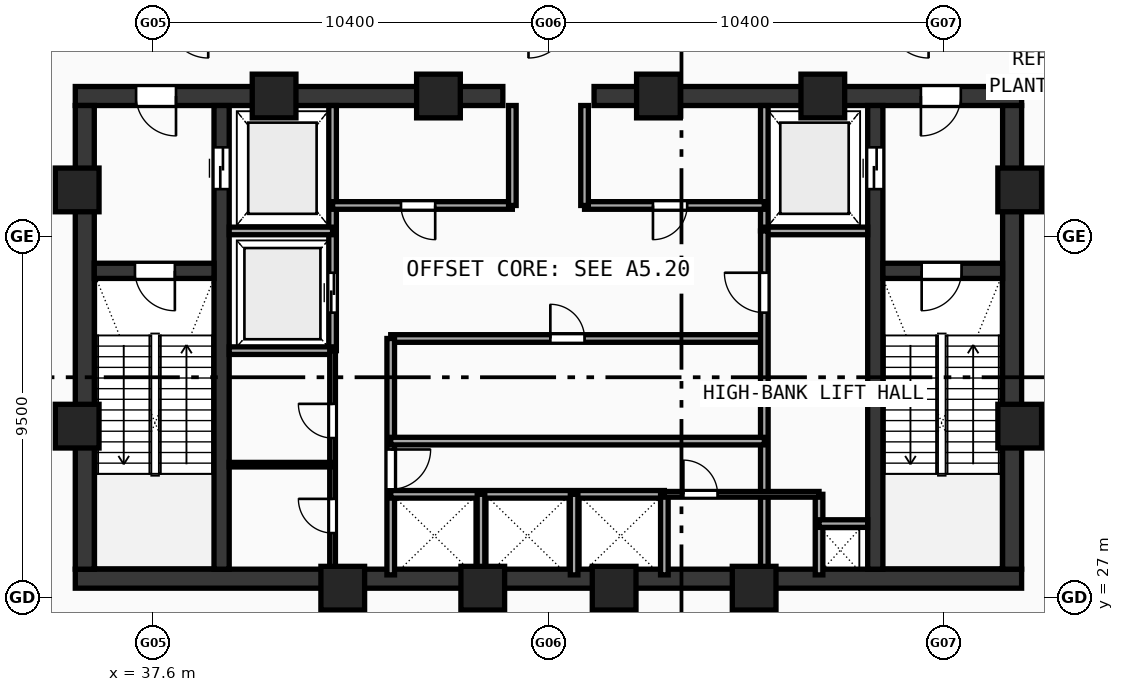
"""IFC4 building model, lengths in metres.
Left out: names, types, materials, properties, quantities, classifications, styles, units other than length and angle.
Written with IfcOpenShell. Run it as: python <this file> out.ifc"""

import sys

from ifc_helpers import new_model, si_unit, direction, frame, frame_2d, origin, origin_with_axes, origin_2d, place, context, subcontext, project, spatial, rectangle, hollow_rectangle, extrude, source, transform, mapped, element, fill, save


model = new_model("IFC4")
c1 = context("Model", 3, precision=1e-05, world=origin(), true_north=direction((0.0, 1.0)))
c2 = subcontext(c1, "Body", "Model", "MODEL_VIEW")
j1 = project(units=[si_unit("LENGTHUNIT", "METRE"), si_unit("PLANEANGLEUNIT", "RADIAN")], contexts=[c1])
p1 = place(None, origin())
s1 = spatial("IfcSite", under=j1, at=p1, CompositionType="ELEMENT")
p2 = place(p1, origin())
s2 = spatial("IfcBuilding", under=s1, at=p2, CompositionType="ELEMENT")
p3 = place(p2, frame((0.0, 0.0, 320.71)))
s3 = spatial("IfcBuildingStorey", under=s2, at=p3, CompositionType="ELEMENT", Elevation=320.71)
p4 = place(p3, frame((35.55, 27.5, 0.0), z_axis=(0.0, 0.0, 1.0), x_axis=(1.0, 0.0, 0.0)))
e1 = element("IfcWall", 1, at=p4, inside=s3, PredefinedType="SHEAR", context=c2, shape_type="SweptSolid", body=[
    extrude(rectangle(XDim=24.9, YDim=0.5, at=frame_2d((12.45, 0.0))), origin(), (0.0, 0.0, 1.0), 4.54),
])
p5 = place(p3, frame((35.55, 40.2, 0.0), z_axis=(0.0, 0.0, 1.0), x_axis=(1.0, 0.0, 0.0)))
e2 = element("IfcWall", 2, at=p5, inside=s3, PredefinedType="SHEAR", context=c2, shape_type="SweptSolid", body=[
    extrude(rectangle(XDim=11.25, YDim=0.5, at=frame_2d((5.625, 0.0))), origin(), (0.0, 0.0, 1.0), 4.54),
])
p6 = place(p5, frame((1.6, 0.0, 0.0)))
e3 = element("IfcOpeningElement", 3, at=p6, cuts=e2, PredefinedType="OPENING", context=c2, shape_type="SweptSolid", body=[
    extrude(rectangle(XDim=1.05, YDim=2.1, at=frame_2d((0.525, 1.05))), frame((0.0, 0.26, 0.0), z_axis=(0.0, -1.0, 0.0), x_axis=(1.0, 0.0, 0.0)), (0.0, 0.0, 1.0), 0.52),
])
p7 = place(p3, frame((49.2, 40.2, 0.0), z_axis=(0.0, 0.0, 1.0), x_axis=(1.0, 0.0, 0.0)))
e4 = element("IfcWall", 4, at=p7, inside=s3, PredefinedType="SHEAR", context=c2, shape_type="SweptSolid", body=[
    extrude(rectangle(XDim=11.25, YDim=0.5, at=frame_2d((5.625, 0.0))), origin(), (0.0, 0.0, 1.0), 4.54),
])
p8 = place(p7, frame((8.6, 0.0, 0.0)))
e5 = element("IfcOpeningElement", 5, at=p8, cuts=e4, PredefinedType="OPENING", context=c2, shape_type="SweptSolid", body=[
    extrude(rectangle(XDim=1.05, YDim=2.1, at=frame_2d((0.525, 1.05))), frame((0.0, 0.26, 0.0), z_axis=(0.0, -1.0, 0.0), x_axis=(1.0, 0.0, 0.0)), (0.0, 0.0, 1.0), 0.52),
])
for number, where, z_axis, x_axis in (
    (6, (35.8, 27.75, 0.0), (0.0, 0.0, 1.0), (0.0, 1.0, 0.0)),
    (7, (60.2, 27.75, 0.0), (0.0, 0.0, 1.0), (0.0, 1.0, 0.0)),
):
    element("IfcWall", number, at=place(p3, frame(where, z_axis=z_axis, x_axis=x_axis)), inside=s3, PredefinedType="SHEAR", context=c2, shape_type="SweptSolid", body=[
        extrude(rectangle(XDim=12.2, YDim=0.5, at=frame_2d((6.1, 0.0))), origin(), (0.0, 0.0, 1.0), 4.54),
    ])
p9 = place(p3, frame((39.4, 27.75, 0.0), z_axis=(0.0, 0.0, 1.0), x_axis=(0.0, 1.0, 0.0)))
e8 = element("IfcWall", 8, at=p9, inside=s3, PredefinedType="SHEAR", context=c2, shape_type="SweptSolid", body=[
    extrude(rectangle(XDim=12.2, YDim=0.4, at=frame_2d((6.1, 0.0))), origin(), (0.0, 0.0, 1.0), 4.54),
])
p10 = place(p9, frame((10.0, 0.0, 0.0)))
e9 = element("IfcOpeningElement", 9, at=p10, cuts=e8, PredefinedType="OPENING", context=c2, shape_type="SweptSolid", body=[
    extrude(rectangle(XDim=1.1, YDim=2.1, at=frame_2d((0.55, 1.05))), frame((0.0, 0.21, 0.0), z_axis=(0.0, -1.0, 0.0), x_axis=(1.0, 0.0, 0.0)), (0.0, 0.0, 1.0), 0.42),
])
p11 = place(p3, frame((56.6, 27.75, 0.0), z_axis=(0.0, 0.0, 1.0), x_axis=(0.0, 1.0, 0.0)))
e10 = element("IfcWall", 10, at=p11, inside=s3, PredefinedType="SHEAR", context=c2, shape_type="SweptSolid", body=[
    extrude(rectangle(XDim=12.2, YDim=0.4, at=frame_2d((6.1, 0.0))), origin(), (0.0, 0.0, 1.0), 4.54),
])
p12 = place(p11, frame((10.0, 0.0, 0.0)))
e11 = element("IfcOpeningElement", 11, at=p12, cuts=e10, PredefinedType="OPENING", context=c2, shape_type="SweptSolid", body=[
    extrude(rectangle(XDim=1.1, YDim=2.1, at=frame_2d((0.55, 1.05))), frame((0.0, 0.21, 0.0), z_axis=(0.0, -1.0, 0.0), x_axis=(1.0, 0.0, 0.0)), (0.0, 0.0, 1.0), 0.42),
])
p13 = place(p3, frame((36.05, 35.6, 0.0), z_axis=(0.0, 0.0, 1.0), x_axis=(1.0, 0.0, 0.0)))
e12 = element("IfcWall", 12, at=p13, inside=s3, PredefinedType="SHEAR", context=c2, shape_type="SweptSolid", body=[
    extrude(rectangle(XDim=3.15, YDim=0.4, at=frame_2d((1.575, 0.0))), origin(), (0.0, 0.0, 1.0), 4.54),
])
p14 = place(p13, frame((1.07, 0.0, 0.0)))
e13 = element("IfcOpeningElement", 13, at=p14, cuts=e12, PredefinedType="OPENING", context=c2, shape_type="SweptSolid", body=[
    extrude(rectangle(XDim=1.05, YDim=2.1, at=frame_2d((0.525, 1.05))), frame((0.0, 0.21, 0.0), z_axis=(0.0, -1.0, 0.0), x_axis=(1.0, 0.0, 0.0)), (0.0, 0.0, 1.0), 0.42),
])
p15 = place(p3, frame((56.8, 35.6, 0.0), z_axis=(0.0, 0.0, 1.0), x_axis=(1.0, 0.0, 0.0)))
e14 = element("IfcWall", 14, at=p15, inside=s3, PredefinedType="SHEAR", context=c2, shape_type="SweptSolid", body=[
    extrude(rectangle(XDim=3.15, YDim=0.4, at=frame_2d((1.575, 0.0))), origin(), (0.0, 0.0, 1.0), 4.54),
])
p16 = place(p15, frame((1.02, 0.0, 0.0)))
e15 = element("IfcOpeningElement", 15, at=p16, cuts=e14, PredefinedType="OPENING", context=c2, shape_type="SweptSolid", body=[
    extrude(rectangle(XDim=1.05, YDim=2.1, at=frame_2d((0.525, 1.05))), frame((0.0, 0.21, 0.0), z_axis=(0.0, -1.0, 0.0), x_axis=(1.0, 0.0, 0.0)), (0.0, 0.0, 1.0), 0.42),
])
m1 = source(origin(), c2, "Body", "SweptSolid", [
    extrude(hollow_rectangle(XDim=1.15, YDim=1.15, WallThickness=0.048, at=origin_2d()), origin(), (0.0, 0.0, 1.0), 4.82),
])
for number, where, z_axis, x_axis in (
    (16, (42.588, 27.25, -0.28), (0.0, 0.0, 1.0), (1.0, 0.0, 0.0)),
    (17, (46.272, 27.25, -0.28), (0.0, 0.0, 1.0), (1.0, 0.0, 0.0)),
    (18, (49.729, 27.25, -0.28), (0.0, 0.0, 1.0), (1.0, 0.0, 0.0)),
    (19, (53.412, 27.25, -0.28), (0.0, 0.0, 1.0), (1.0, 0.0, 0.0)),
    (20, (60.4, 31.513, -0.28), (0.0, 0.0, 1.0), (1.0, 0.0, 0.0)),
    (21, (60.4, 37.729, -0.28), (0.0, 0.0, 1.0), (1.0, 0.0, 0.0)),
    (22, (55.219, 40.2, -0.28), (0.0, 0.0, 1.0), (1.0, 0.0, 0.0)),
    (23, (50.894, 40.2, -0.28), (0.0, 0.0, 1.0), (1.0, 0.0, 0.0)),
    (24, (45.106, 40.2, -0.28), (0.0, 0.0, 1.0), (1.0, 0.0, 0.0)),
    (25, (40.781, 40.2, -0.28), (0.0, 0.0, 1.0), (1.0, 0.0, 0.0)),
    (26, (35.6, 37.729, -0.28), (0.0, 0.0, 1.0), (1.0, 0.0, 0.0)),
    (27, (35.6, 31.513, -0.28), (0.0, 0.0, 1.0), (1.0, 0.0, 0.0)),
):
    element("IfcColumn", number, at=place(p3, frame(where, z_axis=z_axis, x_axis=x_axis)), inside=s3, PredefinedType="COLUMN", context=c2, shape_type="MappedRepresentation", body=[
        mapped(m1, transform((0.0, 0.0, 0.0), scale=1.0)),
    ])
p17 = place(p3, frame((42.32, 33.5, 0.0), z_axis=(0.0, 0.0, 1.0), x_axis=(0.0, 1.0, 0.0)))
e28 = element("IfcWall", 28, at=p17, inside=s3, PredefinedType="SOLIDWALL", context=c2, shape_type="SweptSolid", body=[
    extrude(rectangle(XDim=6.45, YDim=0.2, at=frame_2d((3.225, 0.0))), origin(), (0.0, 0.0, 1.0), 4.54),
])
p18 = place(p17, frame((1.0, 0.0, 0.0)))
e29 = element("IfcOpeningElement", 29, at=p18, cuts=e28, PredefinedType="OPENING", context=c2, shape_type="SweptSolid", body=[
    extrude(rectangle(XDim=1.05, YDim=2.1, at=frame_2d((0.525, 1.05))), frame((0.0, 0.11, 0.0), z_axis=(0.0, -1.0, 0.0), x_axis=(1.0, 0.0, 0.0)), (0.0, 0.0, 1.0), 0.22),
])
for number, where, z_axis, x_axis in (
    (30, (39.6, 36.65, 0.0), (0.0, 0.0, 1.0), (1.0, 0.0, 0.0)),
    (31, (39.6, 33.5, 0.0), (0.0, 0.0, 1.0), (1.0, 0.0, 0.0)),
):
    element("IfcWall", number, at=place(p3, frame(where, z_axis=z_axis, x_axis=x_axis)), inside=s3, PredefinedType="SOLIDWALL", context=c2, shape_type="SweptSolid", body=[
        extrude(rectangle(XDim=2.72, YDim=0.2, at=frame_2d((1.36, 0.0))), origin(), (0.0, 0.0, 1.0), 4.54),
    ])
p19 = place(p3, frame((53.68, 36.65, 0.0), z_axis=(0.0, 0.0, 1.0), x_axis=(0.0, 1.0, 0.0)))
e32 = element("IfcWall", 32, at=p19, inside=s3, PredefinedType="SOLIDWALL", context=c2, shape_type="SweptSolid", body=[
    extrude(rectangle(XDim=3.3, YDim=0.2, at=frame_2d((1.65, 0.0))), origin(), (0.0, 0.0, 1.0), 4.54),
])
p20 = place(p3, frame((53.68, 36.65, 0.0), z_axis=(0.0, 0.0, 1.0), x_axis=(1.0, 0.0, 0.0)))
e33 = element("IfcWall", 33, at=p20, inside=s3, PredefinedType="SOLIDWALL", context=c2, shape_type="SweptSolid", body=[
    extrude(rectangle(XDim=2.72, YDim=0.2, at=frame_2d((1.36, 0.0))), origin(), (0.0, 0.0, 1.0), 4.54),
])
p21 = place(p3, frame((42.32, 37.32, 0.0), z_axis=(0.0, 0.0, 1.0), x_axis=(1.0, 0.0, 0.0)))
e34 = element("IfcWall", 34, at=p21, inside=s3, PredefinedType="SOLIDWALL", context=c2, shape_type="SweptSolid", body=[
    extrude(rectangle(XDim=4.73, YDim=0.2, at=frame_2d((2.365, 0.0))), origin(), (0.0, 0.0, 1.0), 4.54),
])
p22 = place(p21, frame((1.8, 0.0, 0.0)))
e35 = element("IfcOpeningElement", 35, at=p22, cuts=e34, PredefinedType="OPENING", context=c2, shape_type="SweptSolid", body=[
    extrude(rectangle(XDim=0.9, YDim=2.1, at=frame_2d((0.45, 1.05))), frame((0.0, 0.11, 0.0), z_axis=(0.0, -1.0, 0.0), x_axis=(1.0, 0.0, 0.0)), (0.0, 0.0, 1.0), 0.22),
])
p23 = place(p3, frame((48.95, 37.32, 0.0), z_axis=(0.0, 0.0, 1.0), x_axis=(1.0, 0.0, 0.0)))
e36 = element("IfcWall", 36, at=p23, inside=s3, PredefinedType="SOLIDWALL", context=c2, shape_type="SweptSolid", body=[
    extrude(rectangle(XDim=4.73, YDim=0.2, at=frame_2d((2.365, 0.0))), origin(), (0.0, 0.0, 1.0), 4.54),
])
p24 = place(p23, frame((1.8, 0.0, 0.0)))
e37 = element("IfcOpeningElement", 37, at=p24, cuts=e36, PredefinedType="OPENING", context=c2, shape_type="SweptSolid", body=[
    extrude(rectangle(XDim=0.9, YDim=2.1, at=frame_2d((0.45, 1.05))), frame((0.0, 0.11, 0.0), z_axis=(0.0, -1.0, 0.0), x_axis=(1.0, 0.0, 0.0)), (0.0, 0.0, 1.0), 0.22),
])
for number, where, z_axis, x_axis in (
    (38, (47.05, 37.32, 0.0), (0.0, 0.0, 1.0), (0.0, 1.0, 0.0)),
    (39, (48.95, 37.32, 0.0), (0.0, 0.0, 1.0), (0.0, 1.0, 0.0)),
):
    element("IfcWall", number, at=place(p3, frame(where, z_axis=z_axis, x_axis=x_axis)), inside=s3, PredefinedType="SOLIDWALL", context=c2, shape_type="SweptSolid", body=[
        extrude(rectangle(XDim=2.63, YDim=0.2, at=frame_2d((1.315, 0.0))), origin(), (0.0, 0.0, 1.0), 4.54),
    ])
p25 = place(p3, frame((43.85, 33.82, 0.0), z_axis=(0.0, 0.0, 1.0), x_axis=(1.0, 0.0, 0.0)))
e40 = element("IfcWall", 40, at=p25, inside=s3, PredefinedType="SOLIDWALL", context=c2, shape_type="SweptSolid", body=[
    extrude(rectangle(XDim=9.83, YDim=0.2, at=frame_2d((4.915, 0.0))), origin(), (0.0, 0.0, 1.0), 4.54),
])
p26 = place(p25, frame((4.2, 0.0, 0.0)))
e41 = element("IfcOpeningElement", 41, at=p26, cuts=e40, PredefinedType="OPENING", context=c2, shape_type="SweptSolid", body=[
    extrude(rectangle(XDim=0.9, YDim=2.1, at=frame_2d((0.45, 1.05))), frame((0.0, 0.11, 0.0), z_axis=(0.0, -1.0, 0.0), x_axis=(1.0, 0.0, 0.0)), (0.0, 0.0, 1.0), 0.22),
])
p27 = place(p3, frame((43.85, 27.6, 0.0), z_axis=(0.0, 0.0, 1.0), x_axis=(0.0, 1.0, 0.0)))
e42 = element("IfcWall", 42, at=p27, inside=s3, PredefinedType="SOLIDWALL", context=c2, shape_type="SweptSolid", body=[
    extrude(rectangle(XDim=6.22, YDim=0.2, at=frame_2d((3.11, 0.0))), origin(), (0.0, 0.0, 1.0), 4.54),
])
p28 = place(p27, frame((2.25, 0.0, 0.0)))
e43 = element("IfcOpeningElement", 43, at=p28, cuts=e42, PredefinedType="OPENING", context=c2, shape_type="SweptSolid", body=[
    extrude(rectangle(XDim=1.05, YDim=2.1, at=frame_2d((0.525, 1.05))), frame((0.0, 0.11, 0.0), z_axis=(0.0, -1.0, 0.0), x_axis=(1.0, 0.0, 0.0)), (0.0, 0.0, 1.0), 0.22),
])
p29 = place(p3, frame((53.68, 27.6, 0.0), z_axis=(0.0, 0.0, 1.0), x_axis=(0.0, 1.0, 0.0)))
e44 = element("IfcWall", 44, at=p29, inside=s3, PredefinedType="SOLIDWALL", context=c2, shape_type="SweptSolid", body=[
    extrude(rectangle(XDim=9.05, YDim=0.2, at=frame_2d((4.525, 0.0))), origin(), (0.0, 0.0, 1.0), 4.54),
])
p30 = place(p29, frame((6.9, 0.0, 0.0)))
e45 = element("IfcOpeningElement", 45, at=p30, cuts=e44, PredefinedType="OPENING", context=c2, shape_type="SweptSolid", body=[
    extrude(rectangle(XDim=1.05, YDim=2.1, at=frame_2d((0.525, 1.05))), frame((0.0, 0.11, 0.0), z_axis=(0.0, -1.0, 0.0), x_axis=(1.0, 0.0, 0.0)), (0.0, 0.0, 1.0), 0.22),
])
p31 = place(p3, frame((43.85, 29.72, 0.0), z_axis=(0.0, 0.0, 1.0), x_axis=(1.0, 0.0, 0.0)))
e46 = element("IfcWall", 46, at=p31, inside=s3, PredefinedType="SOLIDWALL", context=c2, shape_type="SweptSolid", body=[
    extrude(rectangle(XDim=7.2, YDim=0.2, at=frame_2d((3.6, 0.0))), origin(), (0.0, 0.0, 1.0), 4.54),
])
p32 = place(p3, frame((51.05, 27.6, 0.0), z_axis=(0.0, 0.0, 1.0), x_axis=(0.0, 1.0, 0.0)))
e47 = element("IfcWall", 47, at=p32, inside=s3, PredefinedType="SOLIDWALL", context=c2, shape_type="SweptSolid", body=[
    extrude(rectangle(XDim=2.12, YDim=0.2, at=frame_2d((1.06, 0.0))), origin(), (0.0, 0.0, 1.0), 4.54),
])
p33 = place(p3, frame((43.85, 31.12, 0.0), z_axis=(0.0, 0.0, 1.0), x_axis=(1.0, 0.0, 0.0)))
e48 = element("IfcWall", 48, at=p33, inside=s3, PredefinedType="SOLIDWALL", context=c2, shape_type="SweptSolid", body=[
    extrude(rectangle(XDim=9.83, YDim=0.2, at=frame_2d((4.915, 0.0))), origin(), (0.0, 0.0, 1.0), 4.54),
])
for number, where, z_axis, x_axis in (
    (49, (46.225, 27.6, 0.0), (0.0, 0.0, 1.0), (0.0, 1.0, 0.0)),
    (50, (48.675, 27.6, 0.0), (0.0, 0.0, 1.0), (0.0, 1.0, 0.0)),
    (51, (55.12, 27.6, 0.0), (0.0, 0.0, 1.0), (0.0, 1.0, 0.0)),
):
    element("IfcWall", number, at=place(p3, frame(where, z_axis=z_axis, x_axis=x_axis)), inside=s3, PredefinedType="SOLIDWALL", context=c2, shape_type="SweptSolid", body=[
        extrude(rectangle(XDim=2.12, YDim=0.2, at=frame_2d((1.06, 0.0))), origin(), (0.0, 0.0, 1.0), 4.54),
    ])
p34 = place(p3, frame((55.12, 28.95, 0.0), z_axis=(0.0, 0.0, 1.0), x_axis=(1.0, 0.0, 0.0)))
e52 = element("IfcWall", 52, at=p34, inside=s3, PredefinedType="SOLIDWALL", context=c2, shape_type="SweptSolid", body=[
    extrude(rectangle(XDim=1.28, YDim=0.2, at=frame_2d((0.64, 0.0))), origin(), (0.0, 0.0, 1.0), 4.54),
])
p35 = place(p3, frame((42.32, 27.6, 0.0), z_axis=(0.0, 0.0, 1.0), x_axis=(0.0, 1.0, 0.0)))
e53 = element("IfcWall", 53, at=p35, inside=s3, PredefinedType="PARTITIONING", context=c2, shape_type="SweptSolid", body=[
    extrude(rectangle(XDim=5.9, YDim=0.15, at=frame_2d((2.95, 0.0))), origin(), (0.0, 0.0, 1.0), 4.54),
])
p36 = place(p35, frame((1.1, 0.0, 0.0)))
e54 = element("IfcOpeningElement", 54, at=p36, cuts=e53, PredefinedType="OPENING", context=c2, shape_type="SweptSolid", body=[
    extrude(rectangle(XDim=0.9, YDim=2.1, at=frame_2d((0.45, 1.05))), frame((0.0, 0.085, 0.0), z_axis=(0.0, -1.0, 0.0), x_axis=(1.0, 0.0, 0.0)), (0.0, 0.0, 1.0), 0.17),
])
p37 = place(p35, frame((3.6, 0.0, 0.0)))
e55 = element("IfcOpeningElement", 55, at=p37, cuts=e53, PredefinedType="OPENING", context=c2, shape_type="SweptSolid", body=[
    extrude(rectangle(XDim=0.9, YDim=2.1, at=frame_2d((0.45, 1.05))), frame((0.0, 0.085, 0.0), z_axis=(0.0, -1.0, 0.0), x_axis=(1.0, 0.0, 0.0)), (0.0, 0.0, 1.0), 0.17),
])
p38 = place(p3, frame((51.05, 29.72, 0.0), z_axis=(0.0, 0.0, 1.0), x_axis=(1.0, 0.0, 0.0)))
e56 = element("IfcWall", 56, at=p38, inside=s3, PredefinedType="PARTITIONING", context=c2, shape_type="SweptSolid", body=[
    extrude(rectangle(XDim=4.07, YDim=0.15, at=frame_2d((2.035, 0.0))), origin(), (0.0, 0.0, 1.0), 4.54),
])
p39 = place(p38, frame((0.5, 0.0, 0.0)))
e57 = element("IfcOpeningElement", 57, at=p39, cuts=e56, PredefinedType="OPENING", context=c2, shape_type="SweptSolid", body=[
    extrude(rectangle(XDim=0.9, YDim=2.1, at=frame_2d((0.45, 1.05))), frame((0.0, 0.085, 0.0), z_axis=(0.0, -1.0, 0.0), x_axis=(1.0, 0.0, 0.0)), (0.0, 0.0, 1.0), 0.17),
])
p40 = place(p3, frame((39.6, 30.5, 0.0), z_axis=(0.0, 0.0, 1.0), x_axis=(1.0, 0.0, 0.0)))
e58 = element("IfcWall", 58, at=p40, inside=s3, PredefinedType="PARTITIONING", context=c2, shape_type="SweptSolid", body=[
    extrude(rectangle(XDim=2.72, YDim=0.12, at=frame_2d((1.36, 0.0))), origin(), (0.0, 0.0, 1.0), 4.54),
])
m2 = source(origin(), c2, "Body", "SweptSolid", [
    extrude(rectangle(XDim=1.05, YDim=2.1, at=frame_2d((0.525, 1.05))), frame((0.0, 0.025, 0.0), z_axis=(0.0, -1.0, 0.0), x_axis=(1.0, 0.0, 0.0)), (0.0, 0.0, 1.0), 0.05),
])
p41 = place(p14, frame((1.05, 0.0, 0.0), z_axis=(0.0, 0.0, 1.0), x_axis=(-1.0, 0.0, 0.0)))
e59 = element("IfcDoor", 59, at=p41, inside=s3, OperationType="SINGLE_SWING_LEFT", PredefinedType="DOOR", context=c2, shape_type="MappedRepresentation", body=[
    mapped(m2, transform((0.0, 0.0, 0.0), scale=1.0)),
])
fill(e13, e59)
p42 = place(p16, frame((1.05, 0.0, 0.0), z_axis=(0.0, 0.0, 1.0), x_axis=(-1.0, 0.0, 0.0)))
e60 = element("IfcDoor", 60, at=p42, inside=s3, OperationType="SINGLE_SWING_RIGHT", PredefinedType="DOOR", context=c2, shape_type="MappedRepresentation", body=[
    mapped(m2, transform((0.0, 0.0, 0.0), scale=1.0)),
])
fill(e15, e60)
p43 = place(p6, frame((1.05, 0.0, 0.0), z_axis=(0.0, 0.0, 1.0), x_axis=(-1.0, 0.0, 0.0)))
e61 = element("IfcDoor", 61, at=p43, inside=s3, OperationType="SINGLE_SWING_LEFT", PredefinedType="DOOR", context=c2, shape_type="MappedRepresentation", body=[
    mapped(m2, transform((0.0, 0.0, 0.0), scale=1.0)),
])
fill(e3, e61)
p44 = place(p8, frame((1.05, 0.0, 0.0), z_axis=(0.0, 0.0, 1.0), x_axis=(-1.0, 0.0, 0.0)))
e62 = element("IfcDoor", 62, at=p44, inside=s3, OperationType="SINGLE_SWING_RIGHT", PredefinedType="DOOR", context=c2, shape_type="MappedRepresentation", body=[
    mapped(m2, transform((0.0, 0.0, 0.0), scale=1.0)),
])
fill(e5, e62)
m3 = source(origin(), c2, "Body", "SweptSolid", [
    extrude(rectangle(XDim=1.1, YDim=2.1, at=frame_2d((0.55, 1.05))), frame((0.0, 0.025, 0.0), z_axis=(0.0, -1.0, 0.0), x_axis=(1.0, 0.0, 0.0)), (0.0, 0.0, 1.0), 0.05),
])
p45 = place(p10, frame((1.1, 0.0, 0.0), z_axis=(0.0, 0.0, 1.0), x_axis=(-1.0, 0.0, 0.0)))
e63 = element("IfcDoor", 63, at=p45, inside=s3, OperationType="DOUBLE_DOOR_SLIDING", PredefinedType="DOOR", context=c2, shape_type="MappedRepresentation", body=[
    mapped(m3, transform((0.0, 0.0, 0.0), scale=1.0)),
])
fill(e9, e63)
p46 = place(p12, origin_with_axes())
e64 = element("IfcDoor", 64, at=p46, inside=s3, OperationType="DOUBLE_DOOR_SLIDING", PredefinedType="DOOR", context=c2, shape_type="MappedRepresentation", body=[
    mapped(m3, transform((0.0, 0.0, 0.0), scale=1.0)),
])
fill(e11, e64)
p47 = place(p18, origin_with_axes())
e65 = element("IfcDoor", 65, at=p47, inside=s3, OperationType="DOUBLE_DOOR_SLIDING", PredefinedType="DOOR", context=c2, shape_type="MappedRepresentation", body=[
    mapped(m2, transform((0.0, 0.0, 0.0), scale=1.0)),
])
fill(e29, e65)
m4 = source(origin(), c2, "Body", "SweptSolid", [
    extrude(rectangle(XDim=0.9, YDim=2.1, at=frame_2d((0.45, 1.05))), frame((0.0, 0.025, 0.0), z_axis=(0.0, -1.0, 0.0), x_axis=(1.0, 0.0, 0.0)), (0.0, 0.0, 1.0), 0.05),
])
p48 = place(p22, frame((0.9, 0.0, 0.0), z_axis=(0.0, 0.0, 1.0), x_axis=(-1.0, 0.0, 0.0)))
e66 = element("IfcDoor", 66, at=p48, inside=s3, OperationType="SINGLE_SWING_LEFT", PredefinedType="DOOR", context=c2, shape_type="MappedRepresentation", body=[
    mapped(m4, transform((0.0, 0.0, 0.0), scale=1.0)),
])
fill(e35, e66)
p49 = place(p24, frame((0.9, 0.0, 0.0), z_axis=(0.0, 0.0, 1.0), x_axis=(-1.0, 0.0, 0.0)))
e67 = element("IfcDoor", 67, at=p49, inside=s3, OperationType="SINGLE_SWING_RIGHT", PredefinedType="DOOR", context=c2, shape_type="MappedRepresentation", body=[
    mapped(m4, transform((0.0, 0.0, 0.0), scale=1.0)),
])
fill(e37, e67)
p50 = place(p26, origin_with_axes())
e68 = element("IfcDoor", 68, at=p50, inside=s3, OperationType="SINGLE_SWING_LEFT", PredefinedType="DOOR", context=c2, shape_type="MappedRepresentation", body=[
    mapped(m4, transform((0.0, 0.0, 0.0), scale=1.0)),
])
fill(e41, e68)
p51 = place(p28, frame((1.05, 0.0, 0.0), z_axis=(0.0, 0.0, 1.0), x_axis=(-1.0, 0.0, 0.0)))
e69 = element("IfcDoor", 69, at=p51, inside=s3, OperationType="SINGLE_SWING_LEFT", PredefinedType="DOOR", context=c2, shape_type="MappedRepresentation", body=[
    mapped(m2, transform((0.0, 0.0, 0.0), scale=1.0)),
])
fill(e43, e69)
p52 = place(p30, origin_with_axes())
e70 = element("IfcDoor", 70, at=p52, inside=s3, OperationType="SINGLE_SWING_RIGHT", PredefinedType="DOOR", context=c2, shape_type="MappedRepresentation", body=[
    mapped(m2, transform((0.0, 0.0, 0.0), scale=1.0)),
])
fill(e45, e70)
p53 = place(p36, origin_with_axes())
e71 = element("IfcDoor", 71, at=p53, inside=s3, OperationType="SINGLE_SWING_RIGHT", PredefinedType="DOOR", context=c2, shape_type="MappedRepresentation", body=[
    mapped(m4, transform((0.0, 0.0, 0.0), scale=1.0)),
])
fill(e54, e71)
p54 = place(p37, origin_with_axes())
e72 = element("IfcDoor", 72, at=p54, inside=s3, OperationType="SINGLE_SWING_RIGHT", PredefinedType="DOOR", context=c2, shape_type="MappedRepresentation", body=[
    mapped(m4, transform((0.0, 0.0, 0.0), scale=1.0)),
])
fill(e55, e72)
p55 = place(p39, origin_with_axes())
e73 = element("IfcDoor", 73, at=p55, inside=s3, OperationType="SINGLE_SWING_LEFT", PredefinedType="DOOR", context=c2, shape_type="MappedRepresentation", body=[
    mapped(m4, transform((0.0, 0.0, 0.0), scale=1.0)),
])
fill(e57, e73)
save(model, sys.argv[1])
